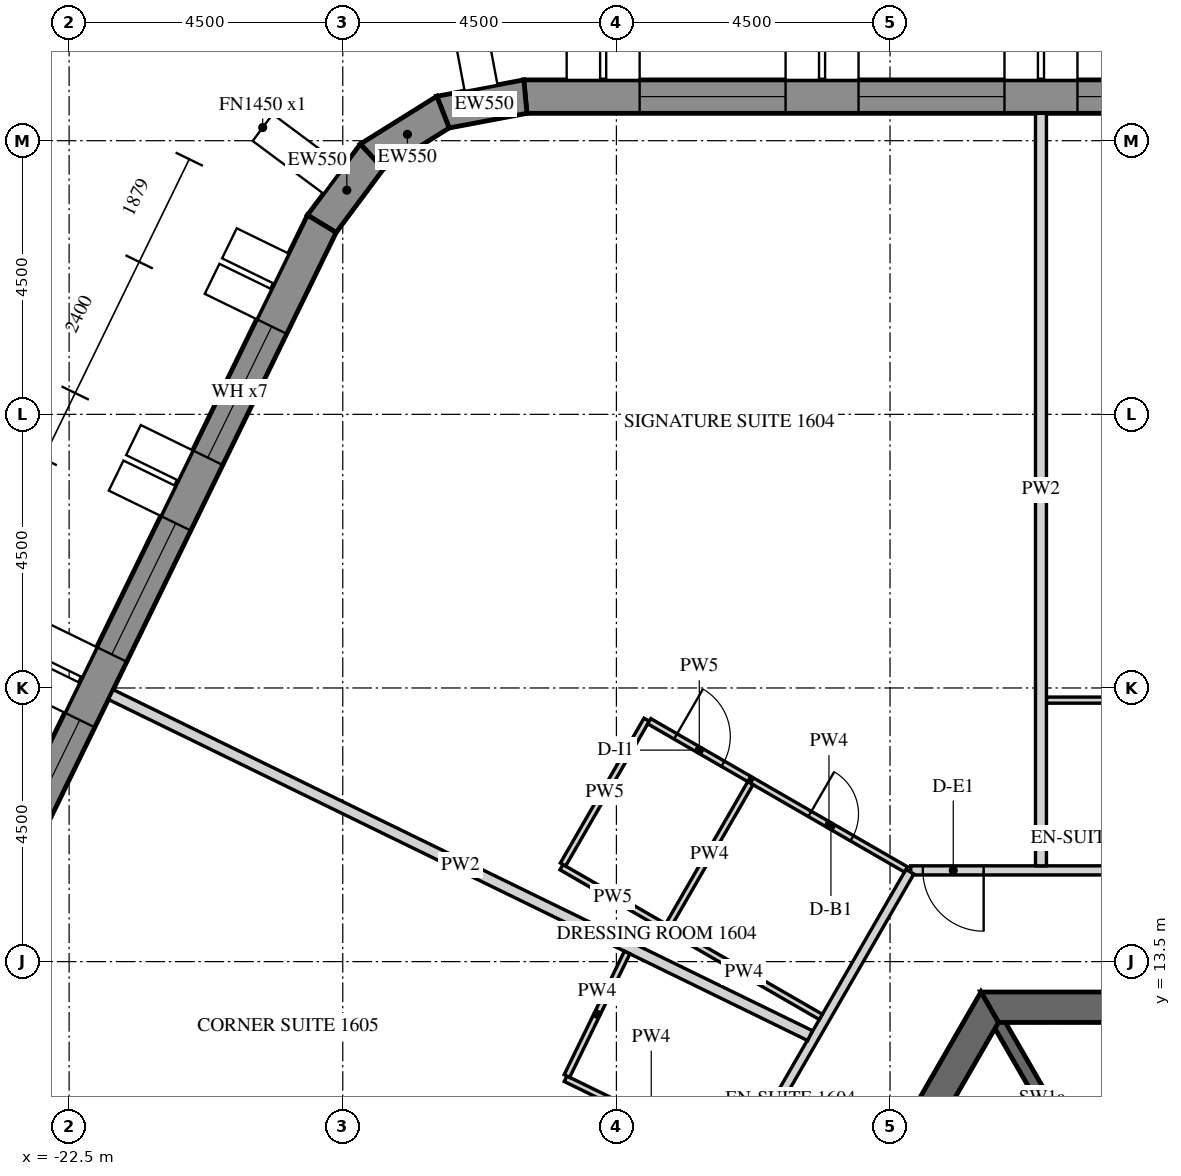
"""IFC4 building model, lengths in metres.
Left out: names, types, materials, properties, quantities, classifications, styles, units other than length and angle.
Written with IfcOpenShell. Run it as: python <this file> out.ifc"""

import sys

from ifc_helpers import new_model, si_unit, direction, frame, frame_2d, origin, place, context, subcontext, project, spatial, polyline, rectangle, outline, extrude, element, fill, save


model = new_model("IFC4")
c1 = context("Model", 3, precision=1e-05, world=origin(), true_north=direction((0.0, 1.0)))
c2 = subcontext(c1, "Body", "Model", "MODEL_VIEW")
j1 = project(units=[si_unit("LENGTHUNIT", "METRE"), si_unit("PLANEANGLEUNIT", "RADIAN")], contexts=[c1])
p1 = place(None, origin())
s1 = spatial("IfcSite", under=j1, at=p1, CompositionType="ELEMENT")
p2 = place(p1, origin())
s2 = spatial("IfcBuilding", under=s1, at=p2, CompositionType="ELEMENT")
p3 = place(p2, frame((0.0, 0.0, 207.3)))
s3 = spatial("IfcBuildingStorey", under=s2, at=p3, CompositionType="ELEMENT", Elevation=207.3)
p4 = place(p3, frame((12.761, 27.725, -0.15), z_axis=(0.0, 0.0, 1.0), x_axis=(-1.0, 0.0, 0.0)))
e1 = element("IfcWall", 1, at=p4, inside=s3, PredefinedType="SOLIDWALL", context=c2, shape_type="SweptSolid", body=[
    extrude(outline(polyline([(-0.022, -0.275), (27.783, -0.275), (27.732, 0.275), (0.022, 0.275), (-0.022, -0.275)])), origin(), (0.0, 0.0, 1.0), 3.9),
])
p5 = place(p4, frame((1.879, 0.0, 1.05)))
e2 = element("IfcOpeningElement", 2, at=p5, cuts=e1, PredefinedType="OPENING", context=c2, shape_type="SweptSolid", body=[
    extrude(rectangle(XDim=2.4, YDim=2.4, at=frame_2d((1.2, 1.2))), frame((0.0, 0.285, 0.0), z_axis=(0.0, -1.0, 0.0), x_axis=(1.0, 0.0, 0.0)), (0.0, 0.0, 1.0), 0.57),
])
p6 = place(p4, frame((5.479, 0.0, 1.05)))
e3 = element("IfcOpeningElement", 3, at=p6, cuts=e1, PredefinedType="OPENING", context=c2, shape_type="SweptSolid", body=[
    extrude(rectangle(XDim=2.4, YDim=2.4, at=frame_2d((1.2, 1.2))), frame((0.0, 0.285, 0.0), z_axis=(0.0, -1.0, 0.0), x_axis=(1.0, 0.0, 0.0)), (0.0, 0.0, 1.0), 0.57),
])
p7 = place(p4, frame((9.079, 0.0, 1.05)))
e4 = element("IfcOpeningElement", 4, at=p7, cuts=e1, PredefinedType="OPENING", context=c2, shape_type="SweptSolid", body=[
    extrude(rectangle(XDim=2.4, YDim=2.4, at=frame_2d((1.2, 1.2))), frame((0.0, 0.285, 0.0), z_axis=(0.0, -1.0, 0.0), x_axis=(1.0, 0.0, 0.0)), (0.0, 0.0, 1.0), 0.57),
])
p8 = place(p4, frame((12.679, 0.0, 1.05)))
e5 = element("IfcOpeningElement", 5, at=p8, cuts=e1, PredefinedType="OPENING", context=c2, shape_type="SweptSolid", body=[
    extrude(rectangle(XDim=2.4, YDim=2.4, at=frame_2d((1.2, 1.2))), frame((0.0, 0.285, 0.0), z_axis=(0.0, -1.0, 0.0), x_axis=(1.0, 0.0, 0.0)), (0.0, 0.0, 1.0), 0.57),
])
p9 = place(p4, frame((16.279, 0.0, 1.05)))
e6 = element("IfcOpeningElement", 6, at=p9, cuts=e1, PredefinedType="OPENING", context=c2, shape_type="SweptSolid", body=[
    extrude(rectangle(XDim=2.4, YDim=2.4, at=frame_2d((1.2, 1.2))), frame((0.0, 0.285, 0.0), z_axis=(0.0, -1.0, 0.0), x_axis=(1.0, 0.0, 0.0)), (0.0, 0.0, 1.0), 0.57),
])
p10 = place(p4, frame((19.879, 0.0, 1.05)))
e7 = element("IfcOpeningElement", 7, at=p10, cuts=e1, PredefinedType="OPENING", context=c2, shape_type="SweptSolid", body=[
    extrude(rectangle(XDim=2.4, YDim=2.4, at=frame_2d((1.2, 1.2))), frame((0.0, 0.285, 0.0), z_axis=(0.0, -1.0, 0.0), x_axis=(1.0, 0.0, 0.0)), (0.0, 0.0, 1.0), 0.57),
])
p11 = place(p4, frame((23.479, 0.0, 1.05)))
e8 = element("IfcOpeningElement", 8, at=p11, cuts=e1, PredefinedType="OPENING", context=c2, shape_type="SweptSolid", body=[
    extrude(rectangle(XDim=2.4, YDim=2.4, at=frame_2d((1.2, 1.2))), frame((0.0, 0.285, 0.0), z_axis=(0.0, -1.0, 0.0), x_axis=(1.0, 0.0, 0.0)), (0.0, 0.0, 1.0), 0.57),
])
p12 = place(p3, frame((-14.997, 27.725, -0.15), z_axis=(0.0, 0.0, 1.0), x_axis=(-0.982705443133, -0.185175624845, 0.0)))
e9 = element("IfcWall", 9, at=p12, inside=s3, PredefinedType="SOLIDWALL", context=c2, shape_type="SweptSolid", body=[
    extrude(outline(polyline([(-0.026, -0.275), (1.431, -0.275), (1.327, 0.275), (0.026, 0.275), (-0.026, -0.275)])), origin(), (0.0, 0.0, 1.0), 3.9),
])
p13 = place(p3, frame((-16.352, 27.47, -0.15), z_axis=(0.0, 0.0, 1.0), x_axis=(-0.848057977594, -0.5299034503, 0.0)))
e10 = element("IfcWall", 10, at=p13, inside=s3, PredefinedType="SOLIDWALL", context=c2, shape_type="SweptSolid", body=[
    extrude(outline(polyline([(-0.052, -0.275), (1.431, -0.275), (1.327, 0.275), (0.052, 0.275), (-0.052, -0.275)])), origin(), (0.0, 0.0, 1.0), 3.9),
])
p14 = place(p3, frame((-17.521, 26.739, -0.15), z_axis=(0.0, 0.0, 1.0), x_axis=(-0.597135295884, -0.802140535324, 0.0)))
e11 = element("IfcWall", 11, at=p14, inside=s3, PredefinedType="SOLIDWALL", context=c2, shape_type="SweptSolid", body=[
    extrude(outline(polyline([(-0.052, -0.275), (1.405, -0.275), (1.354, 0.275), (0.052, 0.275), (-0.052, -0.275)])), origin(), (0.0, 0.0, 1.0), 3.9),
])
p15 = place(p3, frame((-18.345, 25.633, -0.15), z_axis=(0.0, 0.0, 1.0), x_axis=(-0.43837181828, -0.898793718791, 0.0)))
e12 = element("IfcWall", 12, at=p15, inside=s3, PredefinedType="SOLIDWALL", context=c2, shape_type="SweptSolid", body=[
    extrude(outline(polyline([(-0.026, -0.275), (27.78, -0.275), (27.735, 0.275), (0.026, 0.275), (-0.026, -0.275)])), origin(), (0.0, 0.0, 1.0), 3.9),
])
p16 = place(p15, frame((1.879, 0.0, 1.05)))
e13 = element("IfcOpeningElement", 13, at=p16, cuts=e12, PredefinedType="OPENING", context=c2, shape_type="SweptSolid", body=[
    extrude(rectangle(XDim=2.4, YDim=2.4, at=frame_2d((1.2, 1.2))), frame((0.0, 0.285, 0.0), z_axis=(0.0, -1.0, 0.0), x_axis=(1.0, 0.0, 0.0)), (0.0, 0.0, 1.0), 0.57),
])
p17 = place(p15, frame((5.479, 0.0, 1.05)))
e14 = element("IfcOpeningElement", 14, at=p17, cuts=e12, PredefinedType="OPENING", context=c2, shape_type="SweptSolid", body=[
    extrude(rectangle(XDim=2.4, YDim=2.4, at=frame_2d((1.2, 1.2))), frame((0.0, 0.285, 0.0), z_axis=(0.0, -1.0, 0.0), x_axis=(1.0, 0.0, 0.0)), (0.0, 0.0, 1.0), 0.57),
])
p18 = place(p15, frame((9.079, 0.0, 1.05)))
e15 = element("IfcOpeningElement", 15, at=p18, cuts=e12, PredefinedType="OPENING", context=c2, shape_type="SweptSolid", body=[
    extrude(rectangle(XDim=2.4, YDim=2.4, at=frame_2d((1.2, 1.2))), frame((0.0, 0.285, 0.0), z_axis=(0.0, -1.0, 0.0), x_axis=(1.0, 0.0, 0.0)), (0.0, 0.0, 1.0), 0.57),
])
p19 = place(p15, frame((12.679, 0.0, 1.05)))
e16 = element("IfcOpeningElement", 16, at=p19, cuts=e12, PredefinedType="OPENING", context=c2, shape_type="SweptSolid", body=[
    extrude(rectangle(XDim=2.4, YDim=2.4, at=frame_2d((1.2, 1.2))), frame((0.0, 0.285, 0.0), z_axis=(0.0, -1.0, 0.0), x_axis=(1.0, 0.0, 0.0)), (0.0, 0.0, 1.0), 0.57),
])
p20 = place(p15, frame((16.279, 0.0, 1.05)))
e17 = element("IfcOpeningElement", 17, at=p20, cuts=e12, PredefinedType="OPENING", context=c2, shape_type="SweptSolid", body=[
    extrude(rectangle(XDim=2.4, YDim=2.4, at=frame_2d((1.2, 1.2))), frame((0.0, 0.285, 0.0), z_axis=(0.0, -1.0, 0.0), x_axis=(1.0, 0.0, 0.0)), (0.0, 0.0, 1.0), 0.57),
])
p21 = place(p15, frame((19.879, 0.0, 1.05)))
e18 = element("IfcOpeningElement", 18, at=p21, cuts=e12, PredefinedType="OPENING", context=c2, shape_type="SweptSolid", body=[
    extrude(rectangle(XDim=2.4, YDim=2.4, at=frame_2d((1.2, 1.2))), frame((0.0, 0.285, 0.0), z_axis=(0.0, -1.0, 0.0), x_axis=(1.0, 0.0, 0.0)), (0.0, 0.0, 1.0), 0.57),
])
p22 = place(p15, frame((23.479, 0.0, 1.05)))
e19 = element("IfcOpeningElement", 19, at=p22, cuts=e12, PredefinedType="OPENING", context=c2, shape_type="SweptSolid", body=[
    extrude(rectangle(XDim=2.4, YDim=2.4, at=frame_2d((1.2, 1.2))), frame((0.0, 0.285, 0.0), z_axis=(0.0, -1.0, 0.0), x_axis=(1.0, 0.0, 0.0)), (0.0, 0.0, 1.0), 0.57),
])
p23 = place(p3, frame((-7.361, 12.75, -0.15), z_axis=(0.0, 0.0, 1.0), x_axis=(-0.50000571537, -0.866022103989, 0.0)))
e20 = element("IfcWall", 20, at=p23, inside=s3, PredefinedType="SHEAR", context=c2, shape_type="SweptSolid", body=[
    extrude(outline(polyline([(-0.144, -0.25), (14.867, -0.25), (14.578, 0.25), (0.144, 0.25), (-0.144, -0.25)])), origin(), (0.0, 0.0, 1.0), 3.9),
])
p24 = place(p23, frame((6.49, 0.0, 0.15)))
e21 = element("IfcOpeningElement", 21, at=p24, cuts=e20, PredefinedType="OPENING", context=c2, shape_type="SweptSolid", body=[
    extrude(rectangle(XDim=1.8, YDim=2.4, at=frame_2d((0.9, 1.2))), frame((0.0, 0.26, 0.0), z_axis=(0.0, -1.0, 0.0), x_axis=(1.0, 0.0, 0.0)), (0.0, 0.0, 1.0), 0.52),
])
p25 = place(p3, frame((7.361, 12.75, -0.15), z_axis=(0.0, 0.0, 1.0), x_axis=(-1.0, 0.0, 0.0)))
e22 = element("IfcWall", 22, at=p25, inside=s3, PredefinedType="SHEAR", context=c2, shape_type="SweptSolid", body=[
    extrude(outline(polyline([(-0.144, -0.25), (14.866, -0.25), (14.578, 0.25), (0.144, 0.25), (-0.144, -0.25)])), origin(), (0.0, 0.0, 1.0), 3.9),
])
p26 = place(p25, frame((6.761, 0.0, 0.15)))
e23 = element("IfcOpeningElement", 23, at=p26, cuts=e22, PredefinedType="OPENING", context=c2, shape_type="SweptSolid", body=[
    extrude(rectangle(XDim=1.2, YDim=2.4, at=frame_2d((0.6, 1.2))), frame((0.0, 0.26, 0.0), z_axis=(0.0, -1.0, 0.0), x_axis=(1.0, 0.0, 0.0)), (0.0, 0.0, 1.0), 0.52),
])
p27 = place(p3, frame((-5.773, 10.0, -0.15), z_axis=(0.0, 0.0, 1.0), x_axis=(-0.499995765644, 0.866027848477, 0.0)))
e24 = element("IfcWall", 24, at=p27, inside=s3, PredefinedType="SHEAR", context=c2, shape_type="SweptSolid", body=[
    extrude(rectangle(XDim=2.887, YDim=0.2, at=frame_2d((1.443, 0.0))), origin(), (0.0, 0.0, 1.0), 3.9),
])
p28 = place(p3, frame((6.207, 15.0, 0.0), z_axis=(0.0, 0.0, 1.0), x_axis=(-1.0, 0.0, 0.0)))
e25 = element("IfcWall", 25, at=p28, inside=s3, PredefinedType="PARTITIONING", context=c2, shape_type="SweptSolid", body=[
    extrude(rectangle(XDim=14.867, YDim=0.15, at=frame_2d((7.433, 0.0))), origin(), (0.0, 0.0, 1.0), 2.988),
])
p29 = place(p28, frame((3.224, 0.0, 0.0)))
e26 = element("IfcOpeningElement", 26, at=p29, cuts=e25, PredefinedType="OPENING", context=c2, shape_type="SweptSolid", body=[
    extrude(rectangle(XDim=1.0, YDim=2.1, at=frame_2d((0.5, 1.05))), frame((0.0, 0.085, 0.0), z_axis=(0.0, -1.0, 0.0), x_axis=(1.0, 0.0, 0.0)), (0.0, 0.0, 1.0), 0.17),
])
p30 = place(p28, frame((7.224, 0.0, 0.0)))
e27 = element("IfcOpeningElement", 27, at=p30, cuts=e25, PredefinedType="OPENING", context=c2, shape_type="SweptSolid", body=[
    extrude(rectangle(XDim=1.0, YDim=2.1, at=frame_2d((0.5, 1.05))), frame((0.0, 0.085, 0.0), z_axis=(0.0, -1.0, 0.0), x_axis=(1.0, 0.0, 0.0)), (0.0, 0.0, 1.0), 0.17),
])
p31 = place(p28, frame((13.667, 0.0, 0.0)))
e28 = element("IfcOpeningElement", 28, at=p31, cuts=e25, PredefinedType="OPENING", context=c2, shape_type="SweptSolid", body=[
    extrude(rectangle(XDim=1.0, YDim=2.1, at=frame_2d((0.5, 1.05))), frame((0.0, 0.085, 0.0), z_axis=(0.0, -1.0, 0.0), x_axis=(1.0, 0.0, 0.0)), (0.0, 0.0, 1.0), 0.17),
])
p32 = place(p3, frame((-8.673, 14.978, 0.0), z_axis=(0.0, 0.0, 1.0), x_axis=(-0.500009245501, -0.866020065826, 0.0)))
e29 = element("IfcWall", 29, at=p32, inside=s3, PredefinedType="PARTITIONING", context=c2, shape_type="SweptSolid", body=[
    extrude(rectangle(XDim=13.976, YDim=0.15, at=frame_2d((6.988, 0.0))), origin(), (0.0, 0.0, 1.0), 2.988),
])
p33 = place(p32, frame((9.26, 0.0, 0.0)))
e30 = element("IfcOpeningElement", 30, at=p33, cuts=e29, PredefinedType="OPENING", context=c2, shape_type="SweptSolid", body=[
    extrude(rectangle(XDim=1.0, YDim=2.1, at=frame_2d((0.5, 1.05))), frame((0.0, 0.085, 0.0), z_axis=(0.0, -1.0, 0.0), x_axis=(1.0, 0.0, 0.0)), (0.0, 0.0, 1.0), 0.17),
])
p34 = place(p3, frame((-6.428, 17.8, 0.0), z_axis=(0.0, 0.0, 1.0), x_axis=(1.0, 0.0, 0.0)))
e31 = element("IfcWall", 31, at=p34, inside=s3, PredefinedType="PARTITIONING", context=c2, shape_type="SweptSolid", body=[
    extrude(rectangle(XDim=2.71, YDim=0.1, at=frame_2d((1.355, 0.0))), origin(), (0.0, 0.0, 1.0), 2.988),
])
p35 = place(p3, frame((-6.518, 27.45, 0.0), z_axis=(0.0, 0.0, 1.0), x_axis=(0.0, -1.0, 0.0)))
e32 = element("IfcWall", 32, at=p35, inside=s3, PredefinedType="PARTITIONING", context=c2, shape_type="SweptSolid", body=[
    extrude(rectangle(XDim=12.375, YDim=0.18, at=frame_2d((6.188, 0.0))), origin(), (0.0, 0.0, 1.0), 2.988),
])
p36 = place(p3, frame((-10.138, 12.591, 0.0), z_axis=(0.0, 0.0, 1.0), x_axis=(-0.866025730634, 0.499999433879, 0.0)))
e33 = element("IfcWall", 33, at=p36, inside=s3, PredefinedType="PARTITIONING", context=c2, shape_type="SweptSolid", body=[
    extrude(rectangle(XDim=2.925, YDim=0.1, at=frame_2d((1.462, 0.0))), origin(), (0.0, 0.0, 1.0), 2.988),
])
p37 = place(p3, frame((-11.271, 16.478, 0.0), z_axis=(0.0, 0.0, 1.0), x_axis=(0.866046596414, -0.499963291492, 0.0)))
e34 = element("IfcWall", 34, at=p37, inside=s3, PredefinedType="PARTITIONING", context=c2, shape_type="SweptSolid", body=[
    extrude(rectangle(XDim=2.925, YDim=0.1, at=frame_2d((1.462, 0.0))), origin(), (0.0, 0.0, 1.0), 2.988),
])
p38 = place(p37, frame((1.1, 0.0, 0.0)))
e35 = element("IfcOpeningElement", 35, at=p38, cuts=e34, PredefinedType="OPENING", context=c2, shape_type="SweptSolid", body=[
    extrude(rectangle(XDim=0.8, YDim=2.1, at=frame_2d((0.4, 1.05))), frame((0.0, 0.06, 0.0), z_axis=(0.0, -1.0, 0.0), x_axis=(1.0, 0.0, 0.0)), (0.0, 0.0, 1.0), 0.12),
])
p39 = place(p3, frame((-12.714, 14.078, 0.0), z_axis=(0.0, 0.0, 1.0), x_axis=(-0.866000020948, 0.500043961785, 0.0)))
e36 = element("IfcWall", 36, at=p39, inside=s3, PredefinedType="PARTITIONING", context=c2, shape_type="SweptSolid", body=[
    extrude(rectangle(XDim=1.95, YDim=0.1, at=frame_2d((0.975, 0.0))), origin(), (0.0, 0.0, 1.0), 2.988),
])
p40 = place(p3, frame((-14.378, 15.096, 0.0), z_axis=(0.0, 0.0, 1.0), x_axis=(0.499996545922, 0.866027397988, 0.0)))
e37 = element("IfcWall", 37, at=p40, inside=s3, PredefinedType="PARTITIONING", context=c2, shape_type="SweptSolid", body=[
    extrude(rectangle(XDim=2.75, YDim=0.1, at=frame_2d((1.375, 0.0))), origin(), (0.0, 0.0, 1.0), 2.988),
])
p41 = place(p3, frame((-12.96, 17.453, 0.0), z_axis=(0.0, 0.0, 1.0), x_axis=(0.866044365799, -0.499967155389, 0.0)))
e38 = element("IfcWall", 38, at=p41, inside=s3, PredefinedType="PARTITIONING", context=c2, shape_type="SweptSolid", body=[
    extrude(rectangle(XDim=1.9, YDim=0.1, at=frame_2d((0.95, 0.0))), origin(), (0.0, 0.0, 1.0), 2.988),
])
p42 = place(p41, frame((0.5, 0.0, 0.0)))
e39 = element("IfcOpeningElement", 39, at=p42, cuts=e38, PredefinedType="OPENING", context=c2, shape_type="SweptSolid", body=[
    extrude(rectangle(XDim=0.9, YDim=2.1, at=frame_2d((0.45, 1.05))), frame((0.0, 0.06, 0.0), z_axis=(0.0, -1.0, 0.0), x_axis=(1.0, 0.0, 0.0)), (0.0, 0.0, 1.0), 0.12),
])
p43 = place(p3, frame((-21.815, 17.892, 0.0), z_axis=(0.0, 0.0, 1.0), x_axis=(0.898799253997, -0.438360469265, 0.0)))
e40 = element("IfcWall", 40, at=p43, inside=s3, PredefinedType="PARTITIONING", context=c2, shape_type="SweptSolid", body=[
    extrude(rectangle(XDim=12.794, YDim=0.18, at=frame_2d((6.397, 0.0))), origin(), (0.0, 0.0, 1.0), 2.988),
])
p44 = place(p3, frame((-11.296, 16.435, 0.0), z_axis=(0.0, 0.0, 1.0), x_axis=(-0.50000943426, -0.866019956843, 0.0)))
e41 = element("IfcWall", 41, at=p44, inside=s3, PredefinedType="PARTITIONING", context=c2, shape_type="SweptSolid", body=[
    extrude(rectangle(XDim=2.7, YDim=0.1, at=frame_2d((1.35, 0.0))), origin(), (0.0, 0.0, 1.0), 2.988),
])
p45 = place(p3, frame((-11.518, 10.199, 0.0), z_axis=(0.0, 0.0, 1.0), x_axis=(-0.898776679215, 0.438406752799, 0.0)))
e42 = element("IfcWall", 42, at=p45, inside=s3, PredefinedType="PARTITIONING", context=c2, shape_type="SweptSolid", body=[
    extrude(rectangle(XDim=3.135, YDim=0.1, at=frame_2d((1.567, 0.0))), origin(), (0.0, 0.0, 1.0), 2.988),
])
p46 = place(p45, frame((1.235, 0.0, 0.0)))
e43 = element("IfcOpeningElement", 43, at=p46, cuts=e42, PredefinedType="OPENING", context=c2, shape_type="SweptSolid", body=[
    extrude(rectangle(XDim=0.8, YDim=2.1, at=frame_2d((0.4, 1.05))), frame((0.0, 0.06, 0.0), z_axis=(0.0, -1.0, 0.0), x_axis=(1.0, 0.0, 0.0)), (0.0, 0.0, 1.0), 0.12),
])
p47 = place(p3, frame((-14.314, 11.619, 0.0), z_axis=(0.0, 0.0, 1.0), x_axis=(0.438376807268, 0.898791285477, 0.0)))
e44 = element("IfcWall", 44, at=p47, inside=s3, PredefinedType="PARTITIONING", context=c2, shape_type="SweptSolid", body=[
    extrude(rectangle(XDim=2.26, YDim=0.1, at=frame_2d((1.13, 0.0))), origin(), (0.0, 0.0, 1.0), 2.988),
])
p48 = place(p3, frame((-24.971, 11.42, 0.0), z_axis=(0.0, 0.0, 1.0), x_axis=(0.89880199998, -0.438354838951, 0.0)))
e45 = element("IfcWall", 45, at=p48, inside=s3, PredefinedType="PARTITIONING", context=c2, shape_type="SweptSolid", body=[
    extrude(rectangle(XDim=7.691, YDim=0.1, at=frame_2d((3.846, 0.0))), origin(), (0.0, 0.0, 1.0), 2.988),
])
p49 = place(p9, frame((0.0, 0.205, 0.0)))
e46 = element("IfcWindow", 46, at=p49, inside=s3, PartitioningType="DOUBLE_PANEL_VERTICAL", PredefinedType="WINDOW", context=c2, shape_type="SweptSolid", body=[
    extrude(rectangle(XDim=2.4, YDim=2.4, at=frame_2d((1.2, 1.2))), frame((0.0, 0.03, 0.0), z_axis=(0.0, -1.0, 0.0), x_axis=(1.0, 0.0, 0.0)), (0.0, 0.0, 1.0), 0.06),
])
fill(e6, e46)
p50 = place(p10, frame((0.0, 0.205, 0.0)))
e47 = element("IfcWindow", 47, at=p50, inside=s3, PartitioningType="DOUBLE_PANEL_VERTICAL", PredefinedType="WINDOW", context=c2, shape_type="SweptSolid", body=[
    extrude(rectangle(XDim=2.4, YDim=2.4, at=frame_2d((1.2, 1.2))), frame((0.0, 0.03, 0.0), z_axis=(0.0, -1.0, 0.0), x_axis=(1.0, 0.0, 0.0)), (0.0, 0.0, 1.0), 0.06),
])
fill(e7, e47)
p51 = place(p11, frame((0.0, 0.205, 0.0)))
e48 = element("IfcWindow", 48, at=p51, inside=s3, PartitioningType="DOUBLE_PANEL_VERTICAL", PredefinedType="WINDOW", context=c2, shape_type="SweptSolid", body=[
    extrude(rectangle(XDim=2.4, YDim=2.4, at=frame_2d((1.2, 1.2))), frame((0.0, 0.03, 0.0), z_axis=(0.0, -1.0, 0.0), x_axis=(1.0, 0.0, 0.0)), (0.0, 0.0, 1.0), 0.06),
])
fill(e8, e48)
p52 = place(p16, frame((0.0, 0.205, 0.0)))
e49 = element("IfcWindow", 49, at=p52, inside=s3, PartitioningType="DOUBLE_PANEL_VERTICAL", PredefinedType="WINDOW", context=c2, shape_type="SweptSolid", body=[
    extrude(rectangle(XDim=2.4, YDim=2.4, at=frame_2d((1.2, 1.2))), frame((0.0, 0.03, 0.0), z_axis=(0.0, -1.0, 0.0), x_axis=(1.0, 0.0, 0.0)), (0.0, 0.0, 1.0), 0.06),
])
fill(e13, e49)
p53 = place(p17, frame((0.0, 0.205, 0.0)))
e50 = element("IfcWindow", 50, at=p53, inside=s3, PartitioningType="DOUBLE_PANEL_VERTICAL", PredefinedType="WINDOW", context=c2, shape_type="SweptSolid", body=[
    extrude(rectangle(XDim=2.4, YDim=2.4, at=frame_2d((1.2, 1.2))), frame((0.0, 0.03, 0.0), z_axis=(0.0, -1.0, 0.0), x_axis=(1.0, 0.0, 0.0)), (0.0, 0.0, 1.0), 0.06),
])
fill(e14, e50)
p54 = place(p18, frame((0.0, 0.205, 0.0)))
e51 = element("IfcWindow", 51, at=p54, inside=s3, PartitioningType="DOUBLE_PANEL_VERTICAL", PredefinedType="WINDOW", context=c2, shape_type="SweptSolid", body=[
    extrude(rectangle(XDim=2.4, YDim=2.4, at=frame_2d((1.2, 1.2))), frame((0.0, 0.03, 0.0), z_axis=(0.0, -1.0, 0.0), x_axis=(1.0, 0.0, 0.0)), (0.0, 0.0, 1.0), 0.06),
])
fill(e15, e51)
p55 = place(p31, origin())
e52 = element("IfcDoor", 52, at=p55, inside=s3, OperationType="SINGLE_SWING_LEFT", PredefinedType="DOOR", context=c2, shape_type="SweptSolid", body=[
    extrude(rectangle(XDim=1.0, YDim=2.1, at=frame_2d((0.5, 1.05))), frame((0.0, 0.025, 0.0), z_axis=(0.0, -1.0, 0.0), x_axis=(1.0, 0.0, 0.0)), (0.0, 0.0, 1.0), 0.05),
])
fill(e28, e52)
p56 = place(p38, origin())
e53 = element("IfcDoor", 53, at=p56, inside=s3, OperationType="SINGLE_SWING_LEFT", PredefinedType="DOOR", context=c2, shape_type="SweptSolid", body=[
    extrude(rectangle(XDim=0.8, YDim=2.1, at=frame_2d((0.4, 1.05))), frame((0.0, 0.025, 0.0), z_axis=(0.0, -1.0, 0.0), x_axis=(1.0, 0.0, 0.0)), (0.0, 0.0, 1.0), 0.05),
])
fill(e35, e53)
p57 = place(p42, origin())
e54 = element("IfcDoor", 54, at=p57, inside=s3, OperationType="SINGLE_SWING_LEFT", PredefinedType="DOOR", context=c2, shape_type="SweptSolid", body=[
    extrude(rectangle(XDim=0.9, YDim=2.1, at=frame_2d((0.45, 1.05))), frame((0.0, 0.025, 0.0), z_axis=(0.0, -1.0, 0.0), x_axis=(1.0, 0.0, 0.0)), (0.0, 0.0, 1.0), 0.05),
])
fill(e39, e54)
save(model, sys.argv[1])
